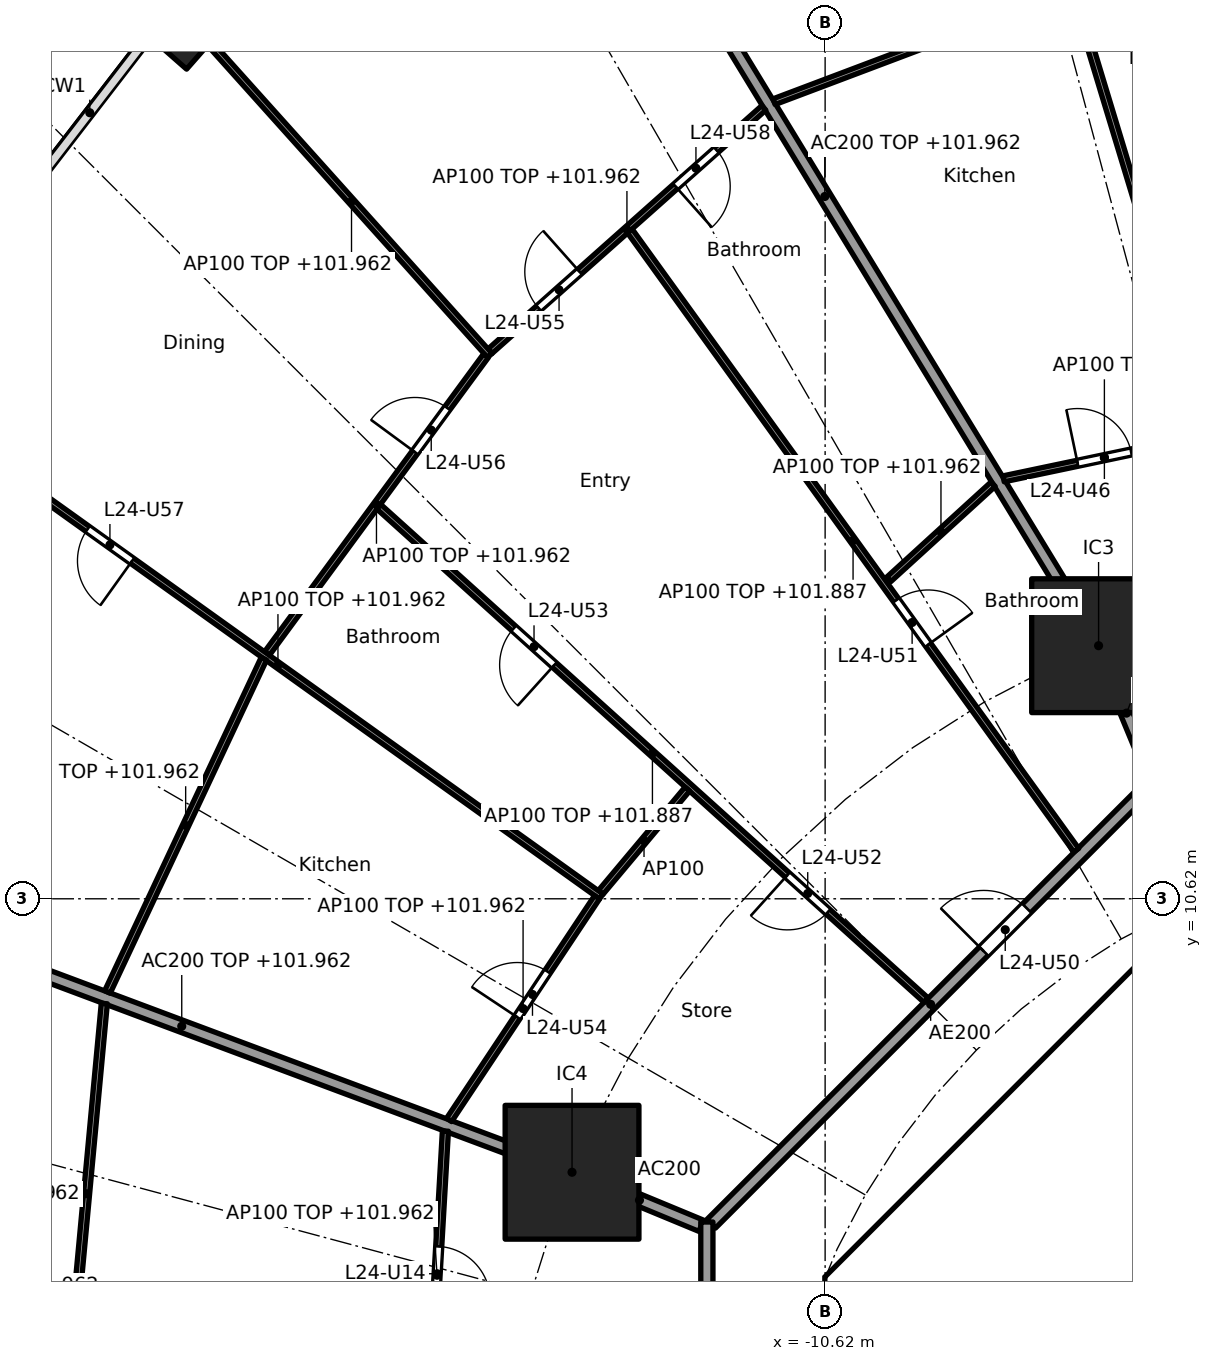
"""IFC4 building model, lengths in metres.
Left out: names, types, materials, properties, quantities, classifications, styles, units other than length and angle.
Written with IfcOpenShell. Run it as: python <this file> out.ifc"""

import sys

from ifc_helpers import new_model, si_unit, direction, frame, frame_2d, origin, origin_2d, place, context, subcontext, project, spatial, polyline, rectangle, hollow_rectangle, outline, extrude, element, fill, save


model = new_model("IFC4")
c1 = context("Model", 3, precision=1e-05, world=origin(), true_north=direction((0.0, 1.0)))
c2 = subcontext(c1, "Body", "Model", "MODEL_VIEW")
j1 = project(units=[si_unit("LENGTHUNIT", "METRE"), si_unit("PLANEANGLEUNIT", "RADIAN")], contexts=[c1])
p1 = place(None, origin())
s1 = spatial("IfcSite", under=j1, at=p1, CompositionType="ELEMENT")
p2 = place(p1, origin())
s2 = spatial("IfcBuilding", under=s1, at=p2, CompositionType="ELEMENT")
p3 = place(p2, frame((0.0, 0.0, 99.2)))
s3 = spatial("IfcBuildingStorey", under=s2, at=p3, CompositionType="ELEMENT", Elevation=99.2)
p4 = place(p3, frame((-21.03, 25.049, 0.0), z_axis=(0.0, 0.0, 1.0), x_axis=(-0.660114607735, -0.751164898445, 0.0)))
e1 = element("IfcColumn", 1, at=p4, inside=s3, PredefinedType="COLUMN", context=c2, shape_type="SweptSolid", body=[
    extrude(hollow_rectangle(XDim=1.3, YDim=0.9, WallThickness=0.045, at=origin_2d()), origin(), (0.0, 0.0, 1.0), 3.7),
])
for number, where, z_axis, x_axis in (
    (2, (-6.123, 14.782, 0.0), (0.0, 0.0, 1.0), (1.0, 0.0, 0.0)),
    (3, (-14.782, 6.123, 0.0), (0.0, 0.0, 1.0), (1.0, 0.0, 0.0)),
):
    element("IfcColumn", number, at=place(p3, frame(where, z_axis=z_axis, x_axis=x_axis)), inside=s3, PredefinedType="COLUMN", context=c2, shape_type="SweptSolid", body=[
        extrude(rectangle(XDim=2.2, YDim=2.2, at=origin_2d()), origin(), (0.0, 0.0, 1.0), 3.7),
    ])
p5 = place(p3, frame((-4.613, 9.988, 0.0), z_axis=(0.0, 0.0, 1.0), x_axis=(-0.707106781187, -0.707106781187, 0.0)))
e4 = element("IfcWall", 4, at=p5, inside=s3, PredefinedType="SHEAR", context=c2, shape_type="SweptSolid", body=[
    extrude(rectangle(XDim=7.602, YDim=0.6, at=frame_2d((3.801, 0.0))), origin(), (0.0, 0.0, 1.0), 3.44),
])
p6 = place(p5, frame((0.351, 0.0, 0.0)))
e5 = element("IfcOpeningElement", 5, at=p6, cuts=e4, PredefinedType="OPENING", context=c2, shape_type="SweptSolid", body=[
    extrude(rectangle(XDim=1.1, YDim=2.1, at=frame_2d((0.55, 1.05))), frame((0.0, 0.31, 0.0), z_axis=(0.0, -1.0, 0.0), x_axis=(1.0, 0.0, 0.0)), (0.0, 0.0, 1.0), 0.62),
])
p7 = place(p3, frame((-7.0, 4.1, 0.0), z_axis=(0.0, 0.0, 1.0), x_axis=(0.0, 1.0, 0.0)))
e6 = element("IfcWall", 6, at=p7, inside=s3, PredefinedType="PARTITIONING", context=c2, shape_type="SweptSolid", body=[
    extrude(rectangle(XDim=2.927, YDim=0.15, at=frame_2d((1.463, 0.0))), origin(), (0.0, 0.0, 1.0), 3.44),
])
p8 = place(p7, frame((1.051, 0.0, 0.0)))
e7 = element("IfcOpeningElement", 7, at=p8, cuts=e6, PredefinedType="OPENING", context=c2, shape_type="SweptSolid", body=[
    extrude(rectangle(XDim=0.9, YDim=2.1, at=frame_2d((0.45, 1.05))), frame((0.0, 0.085, 0.0), z_axis=(0.0, -1.0, 0.0), x_axis=(1.0, 0.0, 0.0)), (0.0, 0.0, 1.0), 0.17),
])
p9 = place(p3, origin())
e8 = element("IfcWall", 8, at=p9, inside=s3, PredefinedType="SHEAR", context=c2, shape_type="SweptSolid", body=[
    extrude(outline(polyline([(-10.2, 4.825), (-9.776, 4.401), (-10.025, 4.152), (-10.025, 3.801), (-10.625, 3.801), (-10.625, 4.401), (-10.2, 4.825)])), origin(), (0.0, 0.0, 1.0), 3.44),
])
p10 = place(p3, frame((-5.243, 12.657, 0.0), z_axis=(0.0, 0.0, 1.0), x_axis=(-0.38273085373, 0.923859888513, 0.0)))
e9 = element("IfcWall", 9, at=p10, inside=s3, PredefinedType="PARTITIONING", context=c2, shape_type="SweptSolid", body=[
    extrude(rectangle(XDim=2.199, YDim=0.2, at=frame_2d((1.1, 0.0))), origin(), (0.0, 0.0, 1.0), 3.44),
])
p11 = place(p3, frame((-6.149, 14.825, 0.0), z_axis=(0.0, 0.0, 1.0), x_axis=(-0.520412862249, 0.853914780763, 0.0)))
e10 = element("IfcWall", 10, at=p11, inside=s3, PredefinedType="PARTITIONING", context=c2, shape_type="SweptSolid", body=[
    extrude(rectangle(XDim=17.202, YDim=0.2, at=frame_2d((8.601, 0.0))), origin(), (0.0, 0.0, 1.0), 2.762),
])
p12 = place(p3, frame((-12.657, 5.243, 0.0), z_axis=(0.0, 0.0, 1.0), x_axis=(-0.923843626288, 0.382770106157, 0.0)))
e11 = element("IfcWall", 11, at=p12, inside=s3, PredefinedType="PARTITIONING", context=c2, shape_type="SweptSolid", body=[
    extrude(rectangle(XDim=2.199, YDim=0.2, at=frame_2d((1.1, 0.0))), origin(), (0.0, 0.0, 1.0), 3.44),
])
p13 = place(p3, frame((-14.829, 6.14, 0.0), z_axis=(0.0, 0.0, 1.0), x_axis=(-0.936597324342, 0.35040755134, 0.0)))
e12 = element("IfcWall", 12, at=p13, inside=s3, PredefinedType="PARTITIONING", context=c2, shape_type="SweptSolid", body=[
    extrude(rectangle(XDim=13.606, YDim=0.2, at=frame_2d((6.803, 0.0))), origin(), (0.0, 0.0, 1.0), 2.762),
])
p14 = place(p3, frame((-5.275, 12.494, 0.0), z_axis=(0.0, 0.0, 1.0), x_axis=(-0.707106781187, -0.707106781187, 0.0)))
e13 = element("IfcWall", 13, at=p14, inside=s3, PredefinedType="PARTITIONING", context=c2, shape_type="SweptSolid", body=[
    extrude(rectangle(XDim=10.209, YDim=0.2, at=frame_2d((5.104, 0.0))), origin(), (0.0, 0.0, 1.0), 3.44),
])
p15 = place(p14, frame((2.87, 0.0, 0.0)))
e14 = element("IfcOpeningElement", 14, at=p15, cuts=e13, PredefinedType="OPENING", context=c2, shape_type="SweptSolid", body=[
    extrude(rectangle(XDim=1.0, YDim=2.1, at=frame_2d((0.5, 1.05))), frame((0.0, 0.11, 0.0), z_axis=(0.0, -1.0, 0.0), x_axis=(1.0, 0.0, 0.0)), (0.0, 0.0, 1.0), 0.22),
])
p16 = place(p3, frame((-12.565, 5.304, 0.0), z_axis=(0.0, 0.0, 1.0), x_axis=(0.0, -1.0, 0.0)))
e15 = element("IfcWall", 15, at=p16, inside=s3, PredefinedType="PARTITIONING", context=c2, shape_type="SweptSolid", body=[
    extrude(rectangle(XDim=10.409, YDim=0.2, at=frame_2d((5.205, 0.0))), origin(), (0.0, 0.0, 1.0), 3.44),
])
p17 = place(p3, frame((-4.306, 18.185, 0.0), z_axis=(0.0, 0.0, 1.0), x_axis=(-0.290183838394, 0.956970919064, 0.0)))
e16 = element("IfcWall", 16, at=p17, inside=s3, PredefinedType="PARTITIONING", context=c2, shape_type="SweptSolid", body=[
    extrude(rectangle(XDim=15.015, YDim=0.1, at=frame_2d((7.508, 0.0))), origin(), (0.0, 0.0, 1.0), 2.762),
])
p18 = place(p17, frame((10.922, 0.0, 0.0)))
e17 = element("IfcOpeningElement", 17, at=p18, cuts=e16, PredefinedType="OPENING", context=c2, shape_type="SweptSolid", body=[
    extrude(rectangle(XDim=0.9, YDim=2.1, at=frame_2d((0.45, 1.05))), frame((0.0, 0.06, 0.0), z_axis=(0.0, -1.0, 0.0), x_axis=(1.0, 0.0, 0.0)), (0.0, 0.0, 1.0), 0.12),
])
p19 = place(p3, frame((-4.37, 18.223, 0.0), z_axis=(0.0, 0.0, 1.0), x_axis=(-0.978633053291, -0.205614559323, 0.0)))
e18 = element("IfcWall", 18, at=p19, inside=s3, PredefinedType="PARTITIONING", context=c2, shape_type="SweptSolid", body=[
    extrude(rectangle(XDim=3.387, YDim=0.1, at=frame_2d((1.694, 0.0))), origin(), (0.0, 0.0, 1.0), 2.762),
])
p20 = place(p19, frame((1.244, 0.0, 0.0)))
e19 = element("IfcOpeningElement", 19, at=p20, cuts=e18, PredefinedType="OPENING", context=c2, shape_type="SweptSolid", body=[
    extrude(rectangle(XDim=0.9, YDim=2.1, at=frame_2d((0.45, 1.05))), frame((0.0, 0.06, 0.0), z_axis=(0.0, -1.0, 0.0), x_axis=(1.0, 0.0, 0.0)), (0.0, 0.0, 1.0), 0.12),
])
p21 = place(p3, frame((-6.596, 25.563, 0.0), z_axis=(0.0, 0.0, 1.0), x_axis=(-0.935624838262, -0.352995980185, 0.0)))
e20 = element("IfcWall", 20, at=p21, inside=s3, PredefinedType="PARTITIONING", context=c2, shape_type="SweptSolid", body=[
    extrude(rectangle(XDim=5.199, YDim=0.1, at=frame_2d((2.6, 0.0))), origin(), (0.0, 0.0, 1.0), 2.762),
])
p22 = place(p3, frame((-7.857, 17.438, 0.0), z_axis=(0.0, 0.0, 1.0), x_axis=(-0.738883513135, -0.673833179665, 0.0)))
e21 = element("IfcWall", 21, at=p22, inside=s3, PredefinedType="PARTITIONING", context=c2, shape_type="SweptSolid", body=[
    extrude(rectangle(XDim=2.323, YDim=0.1, at=frame_2d((1.162, 0.0))), origin(), (0.0, 0.0, 1.0), 2.762),
])
p23 = place(p3, frame((-11.628, 23.626, 0.0), z_axis=(0.0, 0.0, 1.0), x_axis=(-0.747429444005, -0.664341197153, 0.0)))
e22 = element("IfcWall", 22, at=p23, inside=s3, PredefinedType="PARTITIONING", context=c2, shape_type="SweptSolid", body=[
    extrude(rectangle(XDim=6.024, YDim=0.1, at=frame_2d((3.012, 0.0))), origin(), (0.0, 0.0, 1.0), 2.762),
])
p24 = place(p23, frame((4.055, 0.0, 0.0)))
e23 = element("IfcOpeningElement", 23, at=p24, cuts=e22, PredefinedType="OPENING", context=c2, shape_type="SweptSolid", body=[
    extrude(rectangle(XDim=0.9, YDim=2.1, at=frame_2d((0.45, 1.05))), frame((0.0, 0.06, 0.0), z_axis=(0.0, -1.0, 0.0), x_axis=(1.0, 0.0, 0.0)), (0.0, 0.0, 1.0), 0.12),
])
p25 = place(p23, frame((1.043, 0.0, 0.0)))
e24 = element("IfcOpeningElement", 24, at=p25, cuts=e22, PredefinedType="OPENING", context=c2, shape_type="SweptSolid", body=[
    extrude(rectangle(XDim=0.9, YDim=2.1, at=frame_2d((0.45, 1.05))), frame((0.0, 0.06, 0.0), z_axis=(0.0, -1.0, 0.0), x_axis=(1.0, 0.0, 0.0)), (0.0, 0.0, 1.0), 0.12),
])
p26 = place(p3, frame((-6.49, 11.419, 0.0), z_axis=(0.0, 0.0, 1.0), x_axis=(-0.584832823883, 0.811153849839, 0.0)))
e25 = element("IfcWall", 25, at=p26, inside=s3, PredefinedType="PARTITIONING", context=c2, shape_type="SweptSolid", body=[
    extrude(rectangle(XDim=12.553, YDim=0.1, at=frame_2d((6.277, 0.0))), origin(), (0.0, 0.0, 1.0), 2.687),
])
p27 = place(p26, frame((4.166, 0.0, 0.0)))
e26 = element("IfcOpeningElement", 26, at=p27, cuts=e25, PredefinedType="OPENING", context=c2, shape_type="SweptSolid", body=[
    extrude(rectangle(XDim=0.9, YDim=2.1, at=frame_2d((0.45, 1.05))), frame((0.0, 0.06, 0.0), z_axis=(0.0, -1.0, 0.0), x_axis=(1.0, 0.0, 0.0)), (0.0, 0.0, 1.0), 0.12),
])
p28 = place(p3, frame((-16.134, 19.554, 0.0), z_axis=(0.0, 0.0, 1.0), x_axis=(-0.667985610263, 0.74417418961, 0.0)))
e27 = element("IfcWall", 27, at=p28, inside=s3, PredefinedType="PARTITIONING", context=c2, shape_type="SweptSolid", body=[
    extrude(rectangle(XDim=6.809, YDim=0.1, at=frame_2d((3.405, 0.0))), origin(), (0.0, 0.0, 1.0), 2.762),
])
p29 = place(p3, frame((-16.197, 19.551, 0.0), z_axis=(0.0, 0.0, 1.0), x_axis=(-0.592391983588, -0.80564988536, 0.0)))
e28 = element("IfcWall", 28, at=p29, inside=s3, PredefinedType="PARTITIONING", context=c2, shape_type="SweptSolid", body=[
    extrude(rectangle(XDim=6.08, YDim=0.1, at=frame_2d((3.04, 0.0))), origin(), (0.0, 0.0, 1.0), 2.762),
])
p30 = place(p29, frame((1.07, 0.0, 0.0)))
e29 = element("IfcOpeningElement", 29, at=p30, cuts=e28, PredefinedType="OPENING", context=c2, shape_type="SweptSolid", body=[
    extrude(rectangle(XDim=0.9, YDim=2.1, at=frame_2d((0.45, 1.05))), frame((0.0, 0.06, 0.0), z_axis=(0.0, -1.0, 0.0), x_axis=(1.0, 0.0, 0.0)), (0.0, 0.0, 1.0), 0.12),
])
p31 = place(p3, frame((-8.959, 8.952, 0.0), z_axis=(0.0, 0.0, 1.0), x_axis=(-0.742679904999, 0.669646592398, 0.0)))
e30 = element("IfcWall", 30, at=p31, inside=s3, PredefinedType="PARTITIONING", context=c2, shape_type="SweptSolid", body=[
    extrude(rectangle(XDim=12.121, YDim=0.1, at=frame_2d((6.061, 0.0))), origin(), (0.0, 0.0, 1.0), 2.687),
])
p32 = place(p31, frame((2.172, 0.0, 0.0)))
e31 = element("IfcOpeningElement", 31, at=p32, cuts=e30, PredefinedType="OPENING", context=c2, shape_type="SweptSolid", body=[
    extrude(rectangle(XDim=0.9, YDim=2.1, at=frame_2d((0.45, 1.05))), frame((0.0, 0.06, 0.0), z_axis=(0.0, -1.0, 0.0), x_axis=(1.0, 0.0, 0.0)), (0.0, 0.0, 1.0), 0.12),
])
p33 = place(p31, frame((8.233, 0.0, 0.0)))
e32 = element("IfcOpeningElement", 32, at=p33, cuts=e30, PredefinedType="OPENING", context=c2, shape_type="SweptSolid", body=[
    extrude(rectangle(XDim=0.9, YDim=2.1, at=frame_2d((0.45, 1.05))), frame((0.0, 0.06, 0.0), z_axis=(0.0, -1.0, 0.0), x_axis=(1.0, 0.0, 0.0)), (0.0, 0.0, 1.0), 0.12),
])
p34 = place(p3, frame((-12.885, 12.425, 0.0), z_axis=(0.0, 0.0, 1.0), x_axis=(-0.642551826067, -0.766242227248, 0.0)))
e33 = element("IfcWall", 33, at=p34, inside=s3, PredefinedType="PARTITIONING", context=c2, shape_type="SweptSolid", body=[
    extrude(rectangle(XDim=2.219, YDim=0.1, at=frame_2d((1.109, 0.0))), origin(), (0.0, 0.0, 1.0), 3.44),
])
p35 = place(p3, frame((-14.302, 10.657, 0.0), z_axis=(0.0, 0.0, 1.0), x_axis=(-0.813183002698, 0.582008079087, 0.0)))
e34 = element("IfcWall", 34, at=p35, inside=s3, PredefinedType="PARTITIONING", context=c2, shape_type="SweptSolid", body=[
    extrude(rectangle(XDim=13.074, YDim=0.1, at=frame_2d((6.537, 0.0))), origin(), (0.0, 0.0, 1.0), 2.762),
])
p36 = place(p35, frame((9.485, 0.0, 0.0)))
e35 = element("IfcOpeningElement", 35, at=p36, cuts=e34, PredefinedType="OPENING", context=c2, shape_type="SweptSolid", body=[
    extrude(rectangle(XDim=0.9, YDim=2.1, at=frame_2d((0.45, 1.05))), frame((0.0, 0.06, 0.0), z_axis=(0.0, -1.0, 0.0), x_axis=(1.0, 0.0, 0.0)), (0.0, 0.0, 1.0), 0.12),
])
p37 = place(p3, frame((-14.371, 10.645, 0.0), z_axis=(0.0, 0.0, 1.0), x_axis=(-0.553341009285, -0.832954817168, 0.0)))
e36 = element("IfcWall", 36, at=p37, inside=s3, PredefinedType="PARTITIONING", context=c2, shape_type="SweptSolid", body=[
    extrude(rectangle(XDim=4.396, YDim=0.1, at=frame_2d((2.198, 0.0))), origin(), (0.0, 0.0, 1.0), 2.762),
])
p38 = place(p37, frame((1.469, 0.0, 0.0)))
e37 = element("IfcOpeningElement", 37, at=p38, cuts=e36, PredefinedType="OPENING", context=c2, shape_type="SweptSolid", body=[
    extrude(rectangle(XDim=0.9, YDim=2.1, at=frame_2d((0.45, 1.05))), frame((0.0, 0.06, 0.0), z_axis=(0.0, -1.0, 0.0), x_axis=(1.0, 0.0, 0.0)), (0.0, 0.0, 1.0), 0.12),
])
p39 = place(p3, frame((-19.85, 14.567, 0.0), z_axis=(0.0, 0.0, 1.0), x_axis=(-0.424942210745, -0.905220480064, 0.0)))
e38 = element("IfcWall", 38, at=p39, inside=s3, PredefinedType="PARTITIONING", context=c2, shape_type="SweptSolid", body=[
    extrude(rectangle(XDim=6.053, YDim=0.1, at=frame_2d((3.027, 0.0))), origin(), (0.0, 0.0, 1.0), 2.762),
])
p40 = place(p3, frame((-16.865, 6.8, 0.0), z_axis=(0.0, 0.0, 1.0), x_axis=(-0.05777584434, -0.998329580755, 0.0)))
e39 = element("IfcWall", 39, at=p40, inside=s3, PredefinedType="PARTITIONING", context=c2, shape_type="SweptSolid", body=[
    extrude(rectangle(XDim=4.75, YDim=0.1, at=frame_2d((2.375, 0.0))), origin(), (0.0, 0.0, 1.0), 2.762),
])
p41 = place(p40, frame((1.9, 0.0, 0.0)))
e40 = element("IfcOpeningElement", 40, at=p41, cuts=e39, PredefinedType="OPENING", context=c2, shape_type="SweptSolid", body=[
    extrude(rectangle(XDim=0.9, YDim=2.1, at=frame_2d((0.45, 1.05))), frame((0.0, 0.06, 0.0), z_axis=(0.0, -1.0, 0.0), x_axis=(1.0, 0.0, 0.0)), (0.0, 0.0, 1.0), 0.12),
])
p42 = place(p3, frame((-22.474, 8.898, 0.0), z_axis=(0.0, 0.0, 1.0), x_axis=(-0.092756864489, -0.995688788774, 0.0)))
e41 = element("IfcWall", 41, at=p42, inside=s3, PredefinedType="PARTITIONING", context=c2, shape_type="SweptSolid", body=[
    extrude(rectangle(XDim=6.283, YDim=0.1, at=frame_2d((3.141, 0.0))), origin(), (0.0, 0.0, 1.0), 2.762),
])
p43 = place(p8, origin())
e42 = element("IfcDoor", 42, at=p43, inside=s3, OperationType="SINGLE_SWING_LEFT", PredefinedType="DOOR", context=c2, shape_type="SweptSolid", body=[
    extrude(rectangle(XDim=0.9, YDim=2.1, at=frame_2d((0.45, 1.05))), frame((0.0, 0.025, 0.0), z_axis=(0.0, -1.0, 0.0), x_axis=(1.0, 0.0, 0.0)), (0.0, 0.0, 1.0), 0.05),
])
fill(e7, e42)
p44 = place(p6, origin())
e43 = element("IfcDoor", 43, at=p44, inside=s3, OperationType="SINGLE_SWING_LEFT", PredefinedType="DOOR", context=c2, shape_type="SweptSolid", body=[
    extrude(rectangle(XDim=1.1, YDim=2.1, at=frame_2d((0.55, 1.05))), frame((0.0, 0.025, 0.0), z_axis=(0.0, -1.0, 0.0), x_axis=(1.0, 0.0, 0.0)), (0.0, 0.0, 1.0), 0.05),
])
fill(e5, e43)
p45 = place(p41, origin())
e44 = element("IfcDoor", 44, at=p45, inside=s3, OperationType="SINGLE_SWING_RIGHT", PredefinedType="DOOR", context=c2, shape_type="SweptSolid", body=[
    extrude(rectangle(XDim=0.9, YDim=2.1, at=frame_2d((0.45, 1.05))), frame((0.0, 0.025, 0.0), z_axis=(0.0, -1.0, 0.0), x_axis=(1.0, 0.0, 0.0)), (0.0, 0.0, 1.0), 0.05),
])
fill(e40, e44)
p46 = place(p20, frame((0.9, 0.0, 0.0), x_axis=(-1.0, 0.0, 0.0)))
e45 = element("IfcDoor", 45, at=p46, inside=s3, OperationType="SINGLE_SWING_LEFT", PredefinedType="DOOR", context=c2, shape_type="SweptSolid", body=[
    extrude(rectangle(XDim=0.9, YDim=2.1, at=frame_2d((0.45, 1.05))), frame((0.0, 0.025, 0.0), z_axis=(0.0, -1.0, 0.0), x_axis=(1.0, 0.0, 0.0)), (0.0, 0.0, 1.0), 0.05),
])
fill(e19, e45)
p47 = place(p15, frame((1.0, 0.0, 0.0), x_axis=(-1.0, 0.0, 0.0)))
e46 = element("IfcDoor", 46, at=p47, inside=s3, OperationType="SINGLE_SWING_LEFT", PredefinedType="DOOR", context=c2, shape_type="SweptSolid", body=[
    extrude(rectangle(XDim=1.0, YDim=2.1, at=frame_2d((0.5, 1.05))), frame((0.0, 0.025, 0.0), z_axis=(0.0, -1.0, 0.0), x_axis=(1.0, 0.0, 0.0)), (0.0, 0.0, 1.0), 0.05),
])
fill(e14, e46)
p48 = place(p27, frame((0.9, 0.0, 0.0), x_axis=(-1.0, 0.0, 0.0)))
e47 = element("IfcDoor", 47, at=p48, inside=s3, OperationType="SINGLE_SWING_RIGHT", PredefinedType="DOOR", context=c2, shape_type="SweptSolid", body=[
    extrude(rectangle(XDim=0.9, YDim=2.1, at=frame_2d((0.45, 1.05))), frame((0.0, 0.025, 0.0), z_axis=(0.0, -1.0, 0.0), x_axis=(1.0, 0.0, 0.0)), (0.0, 0.0, 1.0), 0.05),
])
fill(e26, e47)
p49 = place(p32, origin())
e48 = element("IfcDoor", 48, at=p49, inside=s3, OperationType="SINGLE_SWING_RIGHT", PredefinedType="DOOR", context=c2, shape_type="SweptSolid", body=[
    extrude(rectangle(XDim=0.9, YDim=2.1, at=frame_2d((0.45, 1.05))), frame((0.0, 0.025, 0.0), z_axis=(0.0, -1.0, 0.0), x_axis=(1.0, 0.0, 0.0)), (0.0, 0.0, 1.0), 0.05),
])
fill(e31, e48)
p50 = place(p33, origin())
e49 = element("IfcDoor", 49, at=p50, inside=s3, OperationType="SINGLE_SWING_LEFT", PredefinedType="DOOR", context=c2, shape_type="SweptSolid", body=[
    extrude(rectangle(XDim=0.9, YDim=2.1, at=frame_2d((0.45, 1.05))), frame((0.0, 0.025, 0.0), z_axis=(0.0, -1.0, 0.0), x_axis=(1.0, 0.0, 0.0)), (0.0, 0.0, 1.0), 0.05),
])
fill(e32, e49)
p51 = place(p38, frame((0.9, 0.0, 0.0), x_axis=(-1.0, 0.0, 0.0)))
e50 = element("IfcDoor", 50, at=p51, inside=s3, OperationType="SINGLE_SWING_LEFT", PredefinedType="DOOR", context=c2, shape_type="SweptSolid", body=[
    extrude(rectangle(XDim=0.9, YDim=2.1, at=frame_2d((0.45, 1.05))), frame((0.0, 0.025, 0.0), z_axis=(0.0, -1.0, 0.0), x_axis=(1.0, 0.0, 0.0)), (0.0, 0.0, 1.0), 0.05),
])
fill(e37, e50)
p52 = place(p24, frame((0.9, 0.0, 0.0), x_axis=(-1.0, 0.0, 0.0)))
e51 = element("IfcDoor", 51, at=p52, inside=s3, OperationType="SINGLE_SWING_RIGHT", PredefinedType="DOOR", context=c2, shape_type="SweptSolid", body=[
    extrude(rectangle(XDim=0.9, YDim=2.1, at=frame_2d((0.45, 1.05))), frame((0.0, 0.025, 0.0), z_axis=(0.0, -1.0, 0.0), x_axis=(1.0, 0.0, 0.0)), (0.0, 0.0, 1.0), 0.05),
])
fill(e23, e51)
p53 = place(p30, frame((0.9, 0.0, 0.0), x_axis=(-1.0, 0.0, 0.0)))
e52 = element("IfcDoor", 52, at=p53, inside=s3, OperationType="SINGLE_SWING_LEFT", PredefinedType="DOOR", context=c2, shape_type="SweptSolid", body=[
    extrude(rectangle(XDim=0.9, YDim=2.1, at=frame_2d((0.45, 1.05))), frame((0.0, 0.025, 0.0), z_axis=(0.0, -1.0, 0.0), x_axis=(1.0, 0.0, 0.0)), (0.0, 0.0, 1.0), 0.05),
])
fill(e29, e52)
p54 = place(p36, origin())
e53 = element("IfcDoor", 53, at=p54, inside=s3, OperationType="SINGLE_SWING_LEFT", PredefinedType="DOOR", context=c2, shape_type="SweptSolid", body=[
    extrude(rectangle(XDim=0.9, YDim=2.1, at=frame_2d((0.45, 1.05))), frame((0.0, 0.025, 0.0), z_axis=(0.0, -1.0, 0.0), x_axis=(1.0, 0.0, 0.0)), (0.0, 0.0, 1.0), 0.05),
])
fill(e35, e53)
p55 = place(p25, origin())
e54 = element("IfcDoor", 54, at=p55, inside=s3, OperationType="SINGLE_SWING_RIGHT", PredefinedType="DOOR", context=c2, shape_type="SweptSolid", body=[
    extrude(rectangle(XDim=0.9, YDim=2.1, at=frame_2d((0.45, 1.05))), frame((0.0, 0.025, 0.0), z_axis=(0.0, -1.0, 0.0), x_axis=(1.0, 0.0, 0.0)), (0.0, 0.0, 1.0), 0.05),
])
fill(e24, e54)
save(model, sys.argv[1])
